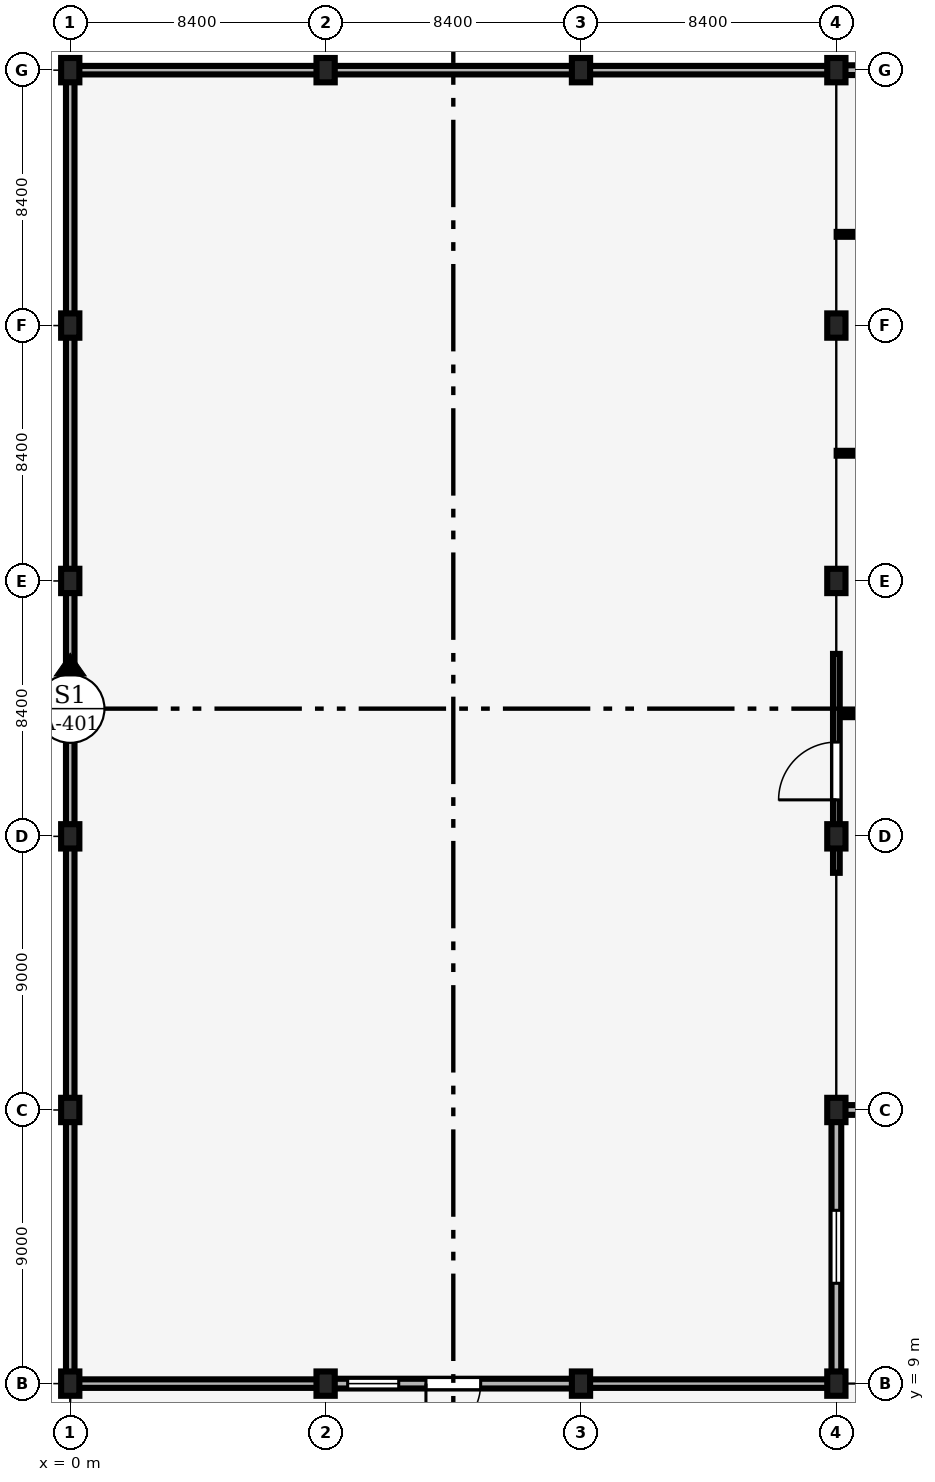
"""IFC4 building model, lengths in metres.
Left out: names, types, materials, properties, quantities, classifications, styles, units other than length and angle.
Written with IfcOpenShell. Run it as: python <this file> out.ifc"""

import sys

from ifc_helpers import new_model, si_unit, direction, frame, frame_2d, origin, origin_2d, place, context, subcontext, project, spatial, rectangle, extrude, element, fill, save


model = new_model("IFC4")
c1 = context("Model", 3, precision=1e-05, world=origin(), true_north=direction((0.0, 1.0)))
c2 = subcontext(c1, "Body", "Model", "MODEL_VIEW")
j1 = project(units=[si_unit("LENGTHUNIT", "METRE"), si_unit("PLANEANGLEUNIT", "RADIAN")], contexts=[c1])
p1 = place(None, origin())
s1 = spatial("IfcSite", under=j1, at=p1, CompositionType="ELEMENT")
p2 = place(p1, origin())
s2 = spatial("IfcBuilding", under=s1, at=p2, CompositionType="ELEMENT")
p3 = place(p2, origin())
s3 = spatial("IfcBuildingStorey", under=s2, at=p3, CompositionType="ELEMENT", Elevation=0.0)
for number, where, z_axis, x_axis in (
    (1, (0.0, 9.0, 0.0), (0.0, 0.0, 1.0), (1.0, 0.0, 0.0)),
    (2, (0.0, 18.0, 0.0), (0.0, 0.0, 1.0), (1.0, 0.0, 0.0)),
    (3, (0.0, 27.0, 0.0), (0.0, 0.0, 1.0), (1.0, 0.0, 0.0)),
    (4, (0.0, 35.4, 0.0), (0.0, 0.0, 1.0), (1.0, 0.0, 0.0)),
    (5, (0.0, 43.8, 0.0), (0.0, 0.0, 1.0), (1.0, 0.0, 0.0)),
    (6, (0.0, 52.2, 0.0), (0.0, 0.0, 1.0), (1.0, 0.0, 0.0)),
    (7, (8.4, 9.0, 0.0), (0.0, 0.0, 1.0), (1.0, 0.0, 0.0)),
    (8, (8.4, 52.2, 0.0), (0.0, 0.0, 1.0), (1.0, 0.0, 0.0)),
    (9, (16.8, 9.0, 0.0), (0.0, 0.0, 1.0), (1.0, 0.0, 0.0)),
    (10, (16.8, 52.2, 0.0), (0.0, 0.0, 1.0), (1.0, 0.0, 0.0)),
    (11, (25.2, 9.0, 0.0), (0.0, 0.0, 1.0), (1.0, 0.0, 0.0)),
    (12, (25.2, 18.0, 0.0), (0.0, 0.0, 1.0), (1.0, 0.0, 0.0)),
    (13, (25.2, 27.0, 0.0), (0.0, 0.0, 1.0), (1.0, 0.0, 0.0)),
    (14, (25.2, 35.4, 0.0), (0.0, 0.0, 1.0), (1.0, 0.0, 0.0)),
    (15, (25.2, 43.8, 0.0), (0.0, 0.0, 1.0), (1.0, 0.0, 0.0)),
    (16, (25.2, 52.2, 0.0), (0.0, 0.0, 1.0), (1.0, 0.0, 0.0)),
):
    element("IfcColumn", number, at=place(p3, frame(where, z_axis=z_axis, x_axis=x_axis)), inside=s3, PredefinedType="COLUMN", context=c2, shape_type="SweptSolid", body=[
        extrude(rectangle(XDim=0.6, YDim=0.8, at=origin_2d()), origin(), (0.0, 0.0, 1.0), 4.8),
    ])
p4 = place(p3, frame((25.475, 52.2, 0.0), z_axis=(0.0, 0.0, 1.0), x_axis=(1.0, 0.0, 0.0)))
e17 = element("IfcWall", 17, at=p4, inside=s3, PredefinedType="SOLIDWALL", context=c2, shape_type="SweptSolid", body=[
    extrude(rectangle(XDim=7.9, YDim=0.32, at=frame_2d((3.95, 0.0))), origin(), (0.0, 0.0, 1.0), 3.87),
])
p5 = place(p4, frame((0.45, 0.0, 0.9)))
e18 = element("IfcOpeningElement", 18, at=p5, cuts=e17, PredefinedType="OPENING", context=c2, shape_type="SweptSolid", body=[
    extrude(rectangle(XDim=1.2, YDim=1.8, at=frame_2d((0.6, 0.9))), frame((0.0, 0.17, 0.0), z_axis=(0.0, -1.0, 0.0), x_axis=(1.0, 0.0, 0.0)), (0.0, 0.0, 1.0), 0.34),
])
p6 = place(p4, frame((5.62, 0.0, 0.9)))
e19 = element("IfcOpeningElement", 19, at=p6, cuts=e17, PredefinedType="OPENING", context=c2, shape_type="SweptSolid", body=[
    extrude(rectangle(XDim=1.68, YDim=2.4, at=frame_2d((0.84, 1.2))), frame((0.0, 0.17, 0.0), z_axis=(0.0, -1.0, 0.0), x_axis=(1.0, 0.0, 0.0)), (0.0, 0.0, 1.0), 0.34),
])
p7 = place(p3, frame((0.275, 52.2, 0.0), z_axis=(0.0, 0.0, 1.0), x_axis=(1.0, 0.0, 0.0)))
e20 = element("IfcWall", 20, at=p7, inside=s3, PredefinedType="SOLIDWALL", context=c2, shape_type="SweptSolid", body=[
    extrude(rectangle(XDim=7.85, YDim=0.28, at=frame_2d((3.925, 0.0))), origin(), (0.0, 0.0, 1.0), 4.267),
])
p8 = place(p3, frame((8.675, 52.2, 0.0), z_axis=(0.0, 0.0, 1.0), x_axis=(1.0, 0.0, 0.0)))
e21 = element("IfcWall", 21, at=p8, inside=s3, PredefinedType="SOLIDWALL", context=c2, shape_type="SweptSolid", body=[
    extrude(rectangle(XDim=7.85, YDim=0.28, at=frame_2d((3.925, 0.0))), origin(), (0.0, 0.0, 1.0), 4.267),
])
p9 = place(p3, frame((17.075, 52.2, 0.0), z_axis=(0.0, 0.0, 1.0), x_axis=(1.0, 0.0, 0.0)))
e22 = element("IfcWall", 22, at=p9, inside=s3, PredefinedType="SOLIDWALL", context=c2, shape_type="SweptSolid", body=[
    extrude(rectangle(XDim=7.85, YDim=0.28, at=frame_2d((3.925, 0.0))), origin(), (0.0, 0.0, 1.0), 4.267),
])
for number, where, z_axis, x_axis in (
    (23, (0.0, 9.375, 0.0), (0.0, 0.0, 1.0), (0.0, 1.0, 0.0)),
    (24, (0.0, 18.375, 0.0), (0.0, 0.0, 1.0), (0.0, 1.0, 0.0)),
):
    element("IfcWall", number, at=place(p3, frame(where, z_axis=z_axis, x_axis=x_axis)), inside=s3, PredefinedType="SOLIDWALL", context=c2, shape_type="SweptSolid", body=[
        extrude(rectangle(XDim=8.25, YDim=0.28, at=frame_2d((4.125, 0.0))), origin(), (0.0, 0.0, 1.0), 4.267),
    ])
p10 = place(p3, frame((0.0, 27.375, 0.0), z_axis=(0.0, 0.0, 1.0), x_axis=(0.0, 1.0, 0.0)))
e25 = element("IfcWall", 25, at=p10, inside=s3, PredefinedType="SOLIDWALL", context=c2, shape_type="SweptSolid", body=[
    extrude(rectangle(XDim=7.65, YDim=0.28, at=frame_2d((3.825, 0.0))), origin(), (0.0, 0.0, 1.0), 4.267),
])
p11 = place(p3, frame((0.0, 35.775, 0.0), z_axis=(0.0, 0.0, 1.0), x_axis=(0.0, 1.0, 0.0)))
e26 = element("IfcWall", 26, at=p11, inside=s3, PredefinedType="SOLIDWALL", context=c2, shape_type="SweptSolid", body=[
    extrude(rectangle(XDim=7.65, YDim=0.28, at=frame_2d((3.825, 0.0))), origin(), (0.0, 0.0, 1.0), 4.267),
])
p12 = place(p3, frame((0.0, 44.175, 0.0), z_axis=(0.0, 0.0, 1.0), x_axis=(0.0, 1.0, 0.0)))
e27 = element("IfcWall", 27, at=p12, inside=s3, PredefinedType="SOLIDWALL", context=c2, shape_type="SweptSolid", body=[
    extrude(rectangle(XDim=7.65, YDim=0.28, at=frame_2d((3.825, 0.0))), origin(), (0.0, 0.0, 1.0), 4.267),
])
p13 = place(p3, frame((0.275, 9.0, 0.0), z_axis=(0.0, 0.0, 1.0), x_axis=(1.0, 0.0, 0.0)))
e28 = element("IfcWall", 28, at=p13, inside=s3, PredefinedType="SOLIDWALL", context=c2, shape_type="SweptSolid", body=[
    extrude(rectangle(XDim=7.85, YDim=0.28, at=frame_2d((3.925, 0.0))), origin(), (0.0, 0.0, 1.0), 4.267),
])
p14 = place(p3, frame((8.675, 9.0, 0.0), z_axis=(0.0, 0.0, 1.0), x_axis=(1.0, 0.0, 0.0)))
e29 = element("IfcWall", 29, at=p14, inside=s3, PredefinedType="SOLIDWALL", context=c2, shape_type="SweptSolid", body=[
    extrude(rectangle(XDim=7.85, YDim=0.32, at=frame_2d((3.925, 0.0))), origin(), (0.0, 0.0, 1.0), 4.267),
])
p15 = place(p14, frame((4.825, 0.0, 0.0), z_axis=(0.0, 0.0, 1.0), x_axis=(-1.0, 0.0, 0.0)))
e30 = element("IfcOpeningElement", 30, at=p15, cuts=e29, PredefinedType="OPENING", context=c2, shape_type="SweptSolid", body=[
    extrude(rectangle(XDim=1.8, YDim=2.35, at=frame_2d((0.9, 1.175))), frame((0.0, 0.17, 0.0), z_axis=(0.0, -1.0, 0.0), x_axis=(1.0, 0.0, 0.0)), (0.0, 0.0, 1.0), 0.34),
])
p16 = place(p14, frame((0.45, 0.0, 0.95)))
e31 = element("IfcOpeningElement", 31, at=p16, cuts=e29, PredefinedType="OPENING", context=c2, shape_type="SweptSolid", body=[
    extrude(rectangle(XDim=1.68, YDim=1.8, at=frame_2d((0.84, 0.9))), frame((0.0, 0.17, 0.0), z_axis=(0.0, -1.0, 0.0), x_axis=(1.0, 0.0, 0.0)), (0.0, 0.0, 1.0), 0.34),
])
p17 = place(p3, frame((17.075, 9.0, 0.0), z_axis=(0.0, 0.0, 1.0), x_axis=(1.0, 0.0, 0.0)))
e32 = element("IfcWall", 32, at=p17, inside=s3, PredefinedType="SOLIDWALL", context=c2, shape_type="SweptSolid", body=[
    extrude(rectangle(XDim=7.85, YDim=0.28, at=frame_2d((3.925, 0.0))), origin(), (0.0, 0.0, 1.0), 4.267),
])
p18 = place(p3, frame((25.2, 9.375, 0.0), z_axis=(0.0, 0.0, 1.0), x_axis=(0.0, 1.0, 0.0)))
e33 = element("IfcWall", 33, at=p18, inside=s3, PredefinedType="SOLIDWALL", context=c2, shape_type="SweptSolid", body=[
    extrude(rectangle(XDim=8.25, YDim=0.32, at=frame_2d((4.125, 0.0))), origin(), (0.0, 0.0, 1.0), 4.267),
])
p19 = place(p18, frame((2.925, 0.0, 0.9)))
e34 = element("IfcOpeningElement", 34, at=p19, cuts=e33, PredefinedType="OPENING", context=c2, shape_type="SweptSolid", body=[
    extrude(rectangle(XDim=2.4, YDim=1.8, at=frame_2d((1.2, 0.9))), frame((0.0, 0.17, 0.0), z_axis=(0.0, -1.0, 0.0), x_axis=(1.0, 0.0, 0.0)), (0.0, 0.0, 1.0), 0.34),
])
p20 = place(p3, frame((25.475, 18.0, 0.0), z_axis=(0.0, 0.0, 1.0), x_axis=(1.0, 0.0, 0.0)))
e35 = element("IfcWall", 35, at=p20, inside=s3, PredefinedType="SOLIDWALL", context=c2, shape_type="SweptSolid", body=[
    extrude(rectangle(XDim=7.9, YDim=0.32, at=frame_2d((3.95, 0.0))), origin(), (0.0, 0.0, 1.0), 3.77),
])
p21 = place(p20, frame((4.775, 0.0, 0.0), z_axis=(0.0, 0.0, 1.0), x_axis=(-1.0, 0.0, 0.0)))
e36 = element("IfcOpeningElement", 36, at=p21, cuts=e35, PredefinedType="OPENING", context=c2, shape_type="SweptSolid", body=[
    extrude(rectangle(XDim=1.65, YDim=2.25, at=frame_2d((0.825, 1.125))), frame((0.0, 0.17, 0.0), z_axis=(0.0, -1.0, 0.0), x_axis=(1.0, 0.0, 0.0)), (0.0, 0.0, 1.0), 0.34),
])
p22 = place(p20, frame((0.45, 0.0, 0.95)))
e37 = element("IfcOpeningElement", 37, at=p22, cuts=e35, PredefinedType="OPENING", context=c2, shape_type="SweptSolid", body=[
    extrude(rectangle(XDim=1.68, YDim=1.8, at=frame_2d((0.84, 0.9))), frame((0.0, 0.17, 0.0), z_axis=(0.0, -1.0, 0.0), x_axis=(1.0, 0.0, 0.0)), (0.0, 0.0, 1.0), 0.34),
])
for number, where, z_axis, x_axis in (
    (38, (25.21, 31.0, 0.0), (0.0, 0.0, 1.0), (1.0, 0.0, 0.0)),
    (39, (25.21, 39.6, 0.0), (0.0, 0.0, 1.0), (1.0, 0.0, 0.0)),
):
    element("IfcWall", number, at=place(p3, frame(where, z_axis=z_axis, x_axis=x_axis)), inside=s3, PredefinedType="PARTITIONING", context=c2, shape_type="SweptSolid", body=[
        extrude(rectangle(XDim=13.685, YDim=0.16, at=frame_2d((6.843, 0.0))), origin(), (0.0, 0.0, 1.0), 4.5),
    ])
p23 = place(p3, frame((25.21, 46.8, 0.0), z_axis=(0.0, 0.0, 1.0), x_axis=(1.0, 0.0, 0.0)))
e40 = element("IfcWall", 40, at=p23, inside=s3, PredefinedType="PARTITIONING", context=c2, shape_type="SweptSolid", body=[
    extrude(rectangle(XDim=13.685, YDim=0.16, at=frame_2d((6.843, 0.0))), origin(), (0.0, 0.0, 1.0), 4.114),
])
p24 = place(p3, frame((25.2, 25.8, 0.0), z_axis=(0.0, 0.0, 1.0), x_axis=(0.0, 1.0, 0.0)))
e41 = element("IfcWall", 41, at=p24, inside=s3, PredefinedType="SOLIDWALL", context=c2, shape_type="SweptSolid", body=[
    extrude(rectangle(XDim=7.2, YDim=0.22, at=frame_2d((3.6, 0.0))), origin(), (0.0, 0.0, 1.0), 3.912),
])
p25 = place(p24, frame((2.4, 0.0, 0.0)))
e42 = element("IfcOpeningElement", 42, at=p25, cuts=e41, PredefinedType="OPENING", context=c2, shape_type="SweptSolid", body=[
    extrude(rectangle(XDim=1.9, YDim=2.4, at=frame_2d((0.95, 1.2))), frame((0.0, 0.12, 0.0), z_axis=(0.0, -1.0, 0.0), x_axis=(1.0, 0.0, 0.0)), (0.0, 0.0, 1.0), 0.24),
])
p26 = place(p15, origin())
e43 = element("IfcDoor", 43, at=p26, inside=s3, OperationType="DOUBLE_DOOR_SINGLE_SWING", PredefinedType="DOOR", context=c2, shape_type="SweptSolid", body=[
    extrude(rectangle(XDim=1.8, YDim=2.35, at=frame_2d((0.9, 1.175))), frame((0.0, 0.025, 0.0), z_axis=(0.0, -1.0, 0.0), x_axis=(1.0, 0.0, 0.0)), (0.0, 0.0, 1.0), 0.05),
])
fill(e30, e43)
p27 = place(p16, origin())
e44 = element("IfcWindow", 44, at=p27, inside=s3, PartitioningType="SINGLE_PANEL", PredefinedType="WINDOW", context=c2, shape_type="SweptSolid", body=[
    extrude(rectangle(XDim=1.68, YDim=1.8, at=frame_2d((0.84, 0.9))), frame((0.0, 0.03, 0.0), z_axis=(0.0, -1.0, 0.0), x_axis=(1.0, 0.0, 0.0)), (0.0, 0.0, 1.0), 0.06),
])
fill(e31, e44)
p28 = place(p19, origin())
e45 = element("IfcWindow", 45, at=p28, inside=s3, PartitioningType="SINGLE_PANEL", PredefinedType="WINDOW", context=c2, shape_type="SweptSolid", body=[
    extrude(rectangle(XDim=2.4, YDim=1.8, at=frame_2d((1.2, 0.9))), frame((0.0, 0.03, 0.0), z_axis=(0.0, -1.0, 0.0), x_axis=(1.0, 0.0, 0.0)), (0.0, 0.0, 1.0), 0.06),
])
fill(e34, e45)
p29 = place(p25, origin())
e46 = element("IfcDoor", 46, at=p29, inside=s3, OperationType="DOUBLE_DOOR_SINGLE_SWING", PredefinedType="DOOR", context=c2, shape_type="SweptSolid", body=[
    extrude(rectangle(XDim=1.9, YDim=2.4, at=frame_2d((0.95, 1.2))), frame((0.0, 0.025, 0.0), z_axis=(0.0, -1.0, 0.0), x_axis=(1.0, 0.0, 0.0)), (0.0, 0.0, 1.0), 0.05),
])
fill(e42, e46)
save(model, sys.argv[1])
